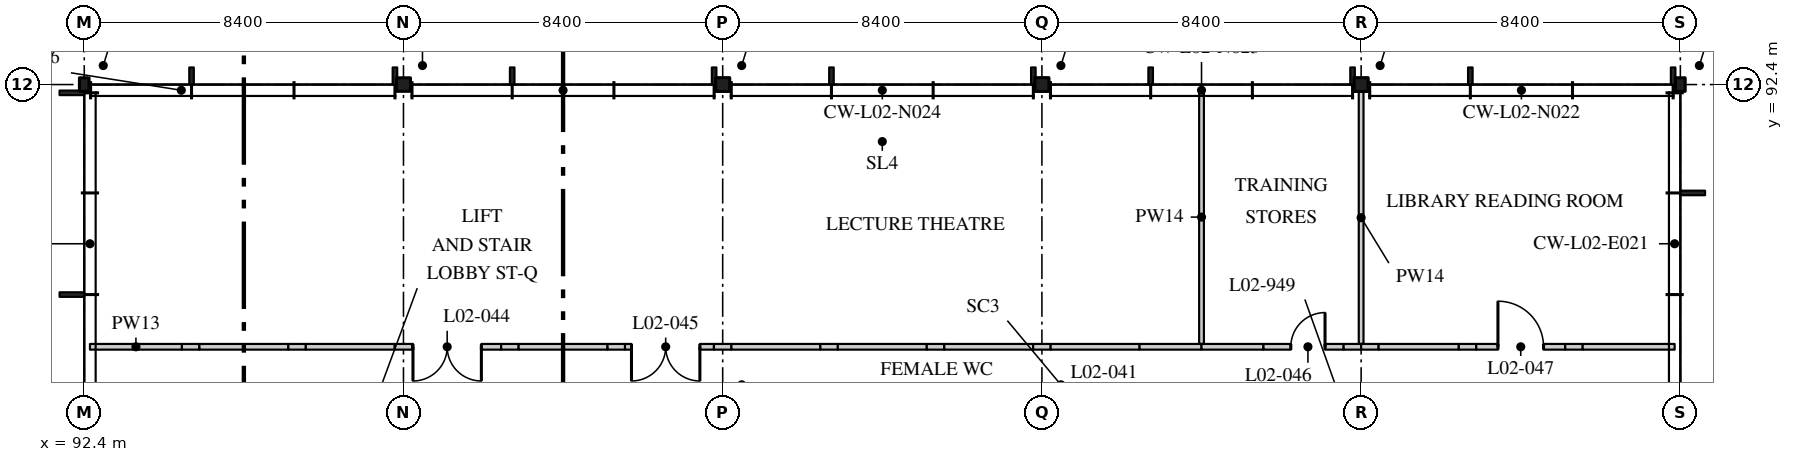
"""IFC4 building model, lengths in metres.
Left out: names, types, materials, properties, quantities, classifications, styles, units other than length and angle.
Written with IfcOpenShell. Run it as: python <this file> out.ifc"""

import sys

from ifc_helpers import new_model, si_unit, direction, frame, frame_2d, origin, origin_2d, place, context, subcontext, project, spatial, rectangle, i_section, extrude, element, fill, save


model = new_model("IFC4")
c1 = context("Model", 3, precision=1e-05, world=origin(), true_north=direction((0.0, 1.0)))
c2 = subcontext(c1, "Body", "Model", "MODEL_VIEW")
j1 = project(units=[si_unit("LENGTHUNIT", "METRE"), si_unit("PLANEANGLEUNIT", "RADIAN")], contexts=[c1])
p1 = place(None, origin())
s1 = spatial("IfcSite", under=j1, at=p1, CompositionType="ELEMENT")
p2 = place(p1, origin())
s2 = spatial("IfcBuilding", under=s1, at=p2, CompositionType="ELEMENT")
p3 = place(p2, frame((0.0, 0.0, 9.9)))
s3 = spatial("IfcBuildingStorey", under=s2, at=p3, CompositionType="ELEMENT", Elevation=9.9)
p4 = place(p3, frame((92.4, 92.4, 0.0), z_axis=(0.0, 0.0, 1.0), x_axis=(1.0, 0.0, 0.0)))
e1 = element("IfcColumn", 1, at=p4, inside=s3, PredefinedType="COLUMN", context=c2, shape_type="SweptSolid", body=[
    extrude(i_section(OverallWidth=0.254, OverallDepth=0.356, WebThickness=0.01, FlangeThickness=0.018, FilletRadius=0.015, at=origin_2d()), origin(), (0.0, 0.0, 1.0), 4.37),
])
p5 = place(p3, frame((100.8, 92.4, 0.0), z_axis=(0.0, 0.0, 1.0), x_axis=(1.0, 0.0, 0.0)))
e2 = element("IfcColumn", 2, at=p5, inside=s3, PredefinedType="COLUMN", context=c2, shape_type="SweptSolid", body=[
    extrude(i_section(OverallWidth=0.368, OverallDepth=0.356, WebThickness=0.011, FlangeThickness=0.018, FilletRadius=0.015, at=origin_2d()), origin(), (0.0, 0.0, 1.0), 4.37),
])
for number, where, z_axis, x_axis in (
    (3, (109.2, 92.4, 0.0), (0.0, 0.0, 1.0), (1.0, 0.0, 0.0)),
    (4, (117.6, 92.4, 0.0), (0.0, 0.0, 1.0), (1.0, 0.0, 0.0)),
    (5, (126.0, 92.4, 0.0), (0.0, 0.0, 1.0), (1.0, 0.0, 0.0)),
):
    element("IfcColumn", number, at=place(p3, frame(where, z_axis=z_axis, x_axis=x_axis)), inside=s3, PredefinedType="COLUMN", context=c2, shape_type="SweptSolid", body=[
        extrude(i_section(OverallWidth=0.371, OverallDepth=0.363, WebThickness=0.013, FlangeThickness=0.022, FilletRadius=0.015, at=origin_2d()), origin(), (0.0, 0.0, 1.0), 4.37),
    ])
p6 = place(p3, frame((134.4, 92.4, 0.0), z_axis=(0.0, 0.0, 1.0), x_axis=(1.0, 0.0, 0.0)))
e6 = element("IfcColumn", 6, at=p6, inside=s3, PredefinedType="COLUMN", context=c2, shape_type="SweptSolid", body=[
    extrude(i_section(OverallWidth=0.254, OverallDepth=0.356, WebThickness=0.01, FlangeThickness=0.018, FilletRadius=0.015, at=origin_2d()), origin(), (0.0, 0.0, 1.0), 4.37),
])
p7 = place(p3, frame((121.8, 85.575, 0.0), z_axis=(0.0, 0.0, 1.0), x_axis=(0.0, 1.0, 0.0)))
e7 = element("IfcWall", 7, at=p7, inside=s3, PredefinedType="PARTITIONING", context=c2, shape_type="SweptSolid", body=[
    extrude(rectangle(XDim=6.675, YDim=0.125, at=frame_2d((3.337, 0.0))), origin(), (0.0, 0.0, 1.0), 4.37),
])
p8 = place(p3, frame((92.55, 85.5, 0.0), z_axis=(0.0, 0.0, 1.0), x_axis=(1.0, 0.0, 0.0)))
e8 = element("IfcWall", 8, at=p8, inside=s3, PredefinedType="PARTITIONING", context=c2, shape_type="SweptSolid", body=[
    extrude(rectangle(XDim=2.42, YDim=0.15, at=frame_2d((1.21, 0.0))), origin(), (0.0, 0.0, 1.0), 4.37),
])
p9 = place(p3, frame((94.97, 85.5, 0.0), z_axis=(0.0, 0.0, 1.0), x_axis=(1.0, 0.0, 0.0)))
e9 = element("IfcWall", 9, at=p9, inside=s3, PredefinedType="PARTITIONING", context=c2, shape_type="SweptSolid", body=[
    extrude(rectangle(XDim=0.46, YDim=0.15, at=frame_2d((0.23, 0.0))), origin(), (0.0, 0.0, 1.0), 3.895),
])
p10 = place(p3, frame((95.43, 85.5, 0.0), z_axis=(0.0, 0.0, 1.0), x_axis=(1.0, 0.0, 0.0)))
e10 = element("IfcWall", 10, at=p10, inside=s3, PredefinedType="PARTITIONING", context=c2, shape_type="SweptSolid", body=[
    extrude(rectangle(XDim=2.34, YDim=0.15, at=frame_2d((1.17, 0.0))), origin(), (0.0, 0.0, 1.0), 4.37),
])
p11 = place(p3, frame((97.77, 85.5, 0.0), z_axis=(0.0, 0.0, 1.0), x_axis=(1.0, 0.0, 0.0)))
e11 = element("IfcWall", 11, at=p11, inside=s3, PredefinedType="PARTITIONING", context=c2, shape_type="SweptSolid", body=[
    extrude(rectangle(XDim=0.46, YDim=0.15, at=frame_2d((0.23, 0.0))), origin(), (0.0, 0.0, 1.0), 3.895),
])
p12 = place(p3, frame((98.23, 85.5, 0.0), z_axis=(0.0, 0.0, 1.0), x_axis=(1.0, 0.0, 0.0)))
e12 = element("IfcWall", 12, at=p12, inside=s3, PredefinedType="PARTITIONING", context=c2, shape_type="SweptSolid", body=[
    extrude(rectangle(XDim=2.34, YDim=0.15, at=frame_2d((1.17, 0.0))), origin(), (0.0, 0.0, 1.0), 4.37),
])
p13 = place(p3, frame((100.57, 85.5, 0.0), z_axis=(0.0, 0.0, 1.0), x_axis=(1.0, 0.0, 0.0)))
e13 = element("IfcWall", 13, at=p13, inside=s3, PredefinedType="PARTITIONING", context=c2, shape_type="SweptSolid", body=[
    extrude(rectangle(XDim=0.46, YDim=0.15, at=frame_2d((0.23, 0.0))), origin(), (0.0, 0.0, 1.0), 3.746),
])
p14 = place(p3, frame((101.03, 85.5, 0.0), z_axis=(0.0, 0.0, 1.0), x_axis=(1.0, 0.0, 0.0)))
e14 = element("IfcWall", 14, at=p14, inside=s3, PredefinedType="PARTITIONING", context=c2, shape_type="SweptSolid", body=[
    extrude(rectangle(XDim=2.34, YDim=0.15, at=frame_2d((1.17, 0.0))), origin(), (0.0, 0.0, 1.0), 4.37),
])
p15 = place(p14, frame((0.02, 0.0, 0.0)))
e15 = element("IfcOpeningElement", 15, at=p15, cuts=e14, PredefinedType="OPENING", context=c2, shape_type="SweptSolid", body=[
    extrude(rectangle(XDim=1.8, YDim=2.4, at=frame_2d((0.9, 1.2))), frame((0.0, 0.085, 0.0), z_axis=(0.0, -1.0, 0.0), x_axis=(1.0, 0.0, 0.0)), (0.0, 0.0, 1.0), 0.17),
])
p16 = place(p3, frame((103.37, 85.5, 0.0), z_axis=(0.0, 0.0, 1.0), x_axis=(1.0, 0.0, 0.0)))
e16 = element("IfcWall", 16, at=p16, inside=s3, PredefinedType="PARTITIONING", context=c2, shape_type="SweptSolid", body=[
    extrude(rectangle(XDim=0.46, YDim=0.15, at=frame_2d((0.23, 0.0))), origin(), (0.0, 0.0, 1.0), 3.895),
])
p17 = place(p3, frame((103.83, 85.5, 0.0), z_axis=(0.0, 0.0, 1.0), x_axis=(1.0, 0.0, 0.0)))
e17 = element("IfcWall", 17, at=p17, inside=s3, PredefinedType="PARTITIONING", context=c2, shape_type="SweptSolid", body=[
    extrude(rectangle(XDim=2.34, YDim=0.15, at=frame_2d((1.17, 0.0))), origin(), (0.0, 0.0, 1.0), 4.37),
])
p18 = place(p3, frame((106.17, 85.5, 0.0), z_axis=(0.0, 0.0, 1.0), x_axis=(1.0, 0.0, 0.0)))
e18 = element("IfcWall", 18, at=p18, inside=s3, PredefinedType="PARTITIONING", context=c2, shape_type="SweptSolid", body=[
    extrude(rectangle(XDim=0.46, YDim=0.15, at=frame_2d((0.23, 0.0))), origin(), (0.0, 0.0, 1.0), 3.895),
])
p19 = place(p3, frame((106.63, 85.5, 0.0), z_axis=(0.0, 0.0, 1.0), x_axis=(1.0, 0.0, 0.0)))
e19 = element("IfcWall", 19, at=p19, inside=s3, PredefinedType="PARTITIONING", context=c2, shape_type="SweptSolid", body=[
    extrude(rectangle(XDim=2.34, YDim=0.15, at=frame_2d((1.17, 0.0))), origin(), (0.0, 0.0, 1.0), 4.37),
])
p20 = place(p19, frame((0.17, 0.0, 0.0)))
e20 = element("IfcOpeningElement", 20, at=p20, cuts=e19, PredefinedType="OPENING", context=c2, shape_type="SweptSolid", body=[
    extrude(rectangle(XDim=1.8, YDim=2.4, at=frame_2d((0.9, 1.2))), frame((0.0, 0.085, 0.0), z_axis=(0.0, -1.0, 0.0), x_axis=(1.0, 0.0, 0.0)), (0.0, 0.0, 1.0), 0.17),
])
p21 = place(p3, frame((108.97, 85.5, 0.0), z_axis=(0.0, 0.0, 1.0), x_axis=(1.0, 0.0, 0.0)))
e21 = element("IfcWall", 21, at=p21, inside=s3, PredefinedType="PARTITIONING", context=c2, shape_type="SweptSolid", body=[
    extrude(rectangle(XDim=0.46, YDim=0.15, at=frame_2d((0.23, 0.0))), origin(), (0.0, 0.0, 1.0), 3.746),
])
p22 = place(p3, frame((109.43, 85.5, 0.0), z_axis=(0.0, 0.0, 1.0), x_axis=(1.0, 0.0, 0.0)))
e22 = element("IfcWall", 22, at=p22, inside=s3, PredefinedType="PARTITIONING", context=c2, shape_type="SweptSolid", body=[
    extrude(rectangle(XDim=2.34, YDim=0.15, at=frame_2d((1.17, 0.0))), origin(), (0.0, 0.0, 1.0), 4.37),
])
p23 = place(p3, frame((111.77, 85.5, 0.0), z_axis=(0.0, 0.0, 1.0), x_axis=(1.0, 0.0, 0.0)))
e23 = element("IfcWall", 23, at=p23, inside=s3, PredefinedType="PARTITIONING", context=c2, shape_type="SweptSolid", body=[
    extrude(rectangle(XDim=0.46, YDim=0.15, at=frame_2d((0.23, 0.0))), origin(), (0.0, 0.0, 1.0), 3.895),
])
p24 = place(p3, frame((112.23, 85.5, 0.0), z_axis=(0.0, 0.0, 1.0), x_axis=(1.0, 0.0, 0.0)))
e24 = element("IfcWall", 24, at=p24, inside=s3, PredefinedType="PARTITIONING", context=c2, shape_type="SweptSolid", body=[
    extrude(rectangle(XDim=2.34, YDim=0.15, at=frame_2d((1.17, 0.0))), origin(), (0.0, 0.0, 1.0), 4.37),
])
p25 = place(p3, frame((114.57, 85.5, 0.0), z_axis=(0.0, 0.0, 1.0), x_axis=(1.0, 0.0, 0.0)))
e25 = element("IfcWall", 25, at=p25, inside=s3, PredefinedType="PARTITIONING", context=c2, shape_type="SweptSolid", body=[
    extrude(rectangle(XDim=0.46, YDim=0.15, at=frame_2d((0.23, 0.0))), origin(), (0.0, 0.0, 1.0), 3.895),
])
p26 = place(p3, frame((115.03, 85.5, 0.0), z_axis=(0.0, 0.0, 1.0), x_axis=(1.0, 0.0, 0.0)))
e26 = element("IfcWall", 26, at=p26, inside=s3, PredefinedType="PARTITIONING", context=c2, shape_type="SweptSolid", body=[
    extrude(rectangle(XDim=2.34, YDim=0.15, at=frame_2d((1.17, 0.0))), origin(), (0.0, 0.0, 1.0), 4.37),
])
p27 = place(p3, frame((117.37, 85.5, 0.0), z_axis=(0.0, 0.0, 1.0), x_axis=(1.0, 0.0, 0.0)))
e27 = element("IfcWall", 27, at=p27, inside=s3, PredefinedType="PARTITIONING", context=c2, shape_type="SweptSolid", body=[
    extrude(rectangle(XDim=0.46, YDim=0.15, at=frame_2d((0.23, 0.0))), origin(), (0.0, 0.0, 1.0), 3.746),
])
p28 = place(p3, frame((117.83, 85.5, 0.0), z_axis=(0.0, 0.0, 1.0), x_axis=(1.0, 0.0, 0.0)))
e28 = element("IfcWall", 28, at=p28, inside=s3, PredefinedType="PARTITIONING", context=c2, shape_type="SweptSolid", body=[
    extrude(rectangle(XDim=2.34, YDim=0.15, at=frame_2d((1.17, 0.0))), origin(), (0.0, 0.0, 1.0), 4.37),
])
p29 = place(p3, frame((120.17, 85.5, 0.0), z_axis=(0.0, 0.0, 1.0), x_axis=(1.0, 0.0, 0.0)))
e29 = element("IfcWall", 29, at=p29, inside=s3, PredefinedType="PARTITIONING", context=c2, shape_type="SweptSolid", body=[
    extrude(rectangle(XDim=1.63, YDim=0.15, at=frame_2d((0.815, 0.0))), origin(), (0.0, 0.0, 1.0), 3.895),
])
p30 = place(p3, frame((126.0, 85.575, 0.0), z_axis=(0.0, 0.0, 1.0), x_axis=(0.0, 1.0, 0.0)))
e30 = element("IfcWall", 30, at=p30, inside=s3, PredefinedType="PARTITIONING", context=c2, shape_type="SweptSolid", body=[
    extrude(rectangle(XDim=6.644, YDim=0.125, at=frame_2d((3.322, 0.0))), origin(), (0.0, 0.0, 1.0), 3.746),
])
p31 = place(p3, frame((121.8, 85.5, 0.0), z_axis=(0.0, 0.0, 1.0), x_axis=(1.0, 0.0, 0.0)))
e31 = element("IfcWall", 31, at=p31, inside=s3, PredefinedType="PARTITIONING", context=c2, shape_type="SweptSolid", body=[
    extrude(rectangle(XDim=1.63, YDim=0.15, at=frame_2d((0.815, 0.0))), origin(), (0.0, 0.0, 1.0), 3.895),
])
p32 = place(p3, frame((123.43, 85.5, 0.0), z_axis=(0.0, 0.0, 1.0), x_axis=(1.0, 0.0, 0.0)))
e32 = element("IfcWall", 32, at=p32, inside=s3, PredefinedType="PARTITIONING", context=c2, shape_type="SweptSolid", body=[
    extrude(rectangle(XDim=2.11, YDim=0.15, at=frame_2d((1.055, 0.0))), origin(), (0.0, 0.0, 1.0), 4.37),
])
p33 = place(p32, frame((0.72, 0.0, 0.0)))
e33 = element("IfcOpeningElement", 33, at=p33, cuts=e32, PredefinedType="OPENING", context=c2, shape_type="SweptSolid", body=[
    extrude(rectangle(XDim=0.9, YDim=2.1, at=frame_2d((0.45, 1.05))), frame((0.0, 0.085, 0.0), z_axis=(0.0, -1.0, 0.0), x_axis=(1.0, 0.0, 0.0)), (0.0, 0.0, 1.0), 0.17),
])
for number, where, z_axis, x_axis in (
    (34, (125.54, 85.5, 0.0), (0.0, 0.0, 1.0), (1.0, 0.0, 0.0)),
    (35, (126.0, 85.5, 0.0), (0.0, 0.0, 1.0), (1.0, 0.0, 0.0)),
):
    element("IfcWall", number, at=place(p3, frame(where, z_axis=z_axis, x_axis=x_axis)), inside=s3, PredefinedType="PARTITIONING", context=c2, shape_type="SweptSolid", body=[
        extrude(rectangle(XDim=0.46, YDim=0.15, at=frame_2d((0.23, 0.0))), origin(), (0.0, 0.0, 1.0), 3.746),
    ])
p34 = place(p3, frame((126.46, 85.5, 0.0), z_axis=(0.0, 0.0, 1.0), x_axis=(1.0, 0.0, 0.0)))
e36 = element("IfcWall", 36, at=p34, inside=s3, PredefinedType="PARTITIONING", context=c2, shape_type="SweptSolid", body=[
    extrude(rectangle(XDim=2.11, YDim=0.15, at=frame_2d((1.055, 0.0))), origin(), (0.0, 0.0, 1.0), 4.37),
])
p35 = place(p3, frame((128.57, 85.5, 0.0), z_axis=(0.0, 0.0, 1.0), x_axis=(1.0, 0.0, 0.0)))
e37 = element("IfcWall", 37, at=p35, inside=s3, PredefinedType="PARTITIONING", context=c2, shape_type="SweptSolid", body=[
    extrude(rectangle(XDim=0.46, YDim=0.15, at=frame_2d((0.23, 0.0))), origin(), (0.0, 0.0, 1.0), 3.895),
])
p36 = place(p3, frame((129.03, 85.5, 0.0), z_axis=(0.0, 0.0, 1.0), x_axis=(1.0, 0.0, 0.0)))
e38 = element("IfcWall", 38, at=p36, inside=s3, PredefinedType="PARTITIONING", context=c2, shape_type="SweptSolid", body=[
    extrude(rectangle(XDim=2.34, YDim=0.15, at=frame_2d((1.17, 0.0))), origin(), (0.0, 0.0, 1.0), 4.37),
])
p37 = place(p36, frame((0.57, 0.0, 0.0)))
e39 = element("IfcOpeningElement", 39, at=p37, cuts=e38, PredefinedType="OPENING", context=c2, shape_type="SweptSolid", body=[
    extrude(rectangle(XDim=1.2, YDim=2.4, at=frame_2d((0.6, 1.2))), frame((0.0, 0.085, 0.0), z_axis=(0.0, -1.0, 0.0), x_axis=(1.0, 0.0, 0.0)), (0.0, 0.0, 1.0), 0.17),
])
p38 = place(p3, frame((131.37, 85.5, 0.0), z_axis=(0.0, 0.0, 1.0), x_axis=(1.0, 0.0, 0.0)))
e40 = element("IfcWall", 40, at=p38, inside=s3, PredefinedType="PARTITIONING", context=c2, shape_type="SweptSolid", body=[
    extrude(rectangle(XDim=0.46, YDim=0.15, at=frame_2d((0.23, 0.0))), origin(), (0.0, 0.0, 1.0), 3.895),
])
p39 = place(p3, frame((131.83, 85.5, 0.0), z_axis=(0.0, 0.0, 1.0), x_axis=(1.0, 0.0, 0.0)))
e41 = element("IfcWall", 41, at=p39, inside=s3, PredefinedType="PARTITIONING", context=c2, shape_type="SweptSolid", body=[
    extrude(rectangle(XDim=2.42, YDim=0.15, at=frame_2d((1.21, 0.0))), origin(), (0.0, 0.0, 1.0), 4.37),
])
p40 = place(p15, frame((1.8, 0.0, 0.0), z_axis=(0.0, 0.0, 1.0), x_axis=(-1.0, 0.0, 0.0)))
e42 = element("IfcDoor", 42, at=p40, inside=s3, OperationType="DOUBLE_DOOR_SINGLE_SWING", PredefinedType="DOOR", context=c2, shape_type="SweptSolid", body=[
    extrude(rectangle(XDim=1.8, YDim=2.4, at=frame_2d((0.9, 1.2))), frame((0.0, 0.025, 0.0), z_axis=(0.0, -1.0, 0.0), x_axis=(1.0, 0.0, 0.0)), (0.0, 0.0, 1.0), 0.05),
])
fill(e15, e42)
p41 = place(p20, frame((1.8, 0.0, 0.0), z_axis=(0.0, 0.0, 1.0), x_axis=(-1.0, 0.0, 0.0)))
e43 = element("IfcDoor", 43, at=p41, inside=s3, OperationType="DOUBLE_DOOR_SINGLE_SWING", PredefinedType="DOOR", context=c2, shape_type="SweptSolid", body=[
    extrude(rectangle(XDim=1.8, YDim=2.4, at=frame_2d((0.9, 1.2))), frame((0.0, 0.025, 0.0), z_axis=(0.0, -1.0, 0.0), x_axis=(1.0, 0.0, 0.0)), (0.0, 0.0, 1.0), 0.05),
])
fill(e20, e43)
p42 = place(p33, origin())
e44 = element("IfcDoor", 44, at=p42, inside=s3, OperationType="SINGLE_SWING_LEFT", PredefinedType="DOOR", context=c2, shape_type="SweptSolid", body=[
    extrude(rectangle(XDim=0.9, YDim=2.1, at=frame_2d((0.45, 1.05))), frame((0.0, 0.025, 0.0), z_axis=(0.0, -1.0, 0.0), x_axis=(1.0, 0.0, 0.0)), (0.0, 0.0, 1.0), 0.05),
])
fill(e33, e44)
p43 = place(p37, origin())
e45 = element("IfcDoor", 45, at=p43, inside=s3, OperationType="SINGLE_SWING_RIGHT", PredefinedType="DOOR", context=c2, shape_type="SweptSolid", body=[
    extrude(rectangle(XDim=1.2, YDim=2.4, at=frame_2d((0.6, 1.2))), frame((0.0, 0.025, 0.0), z_axis=(0.0, -1.0, 0.0), x_axis=(1.0, 0.0, 0.0)), (0.0, 0.0, 1.0), 0.05),
])
fill(e39, e45)
save(model, sys.argv[1])
